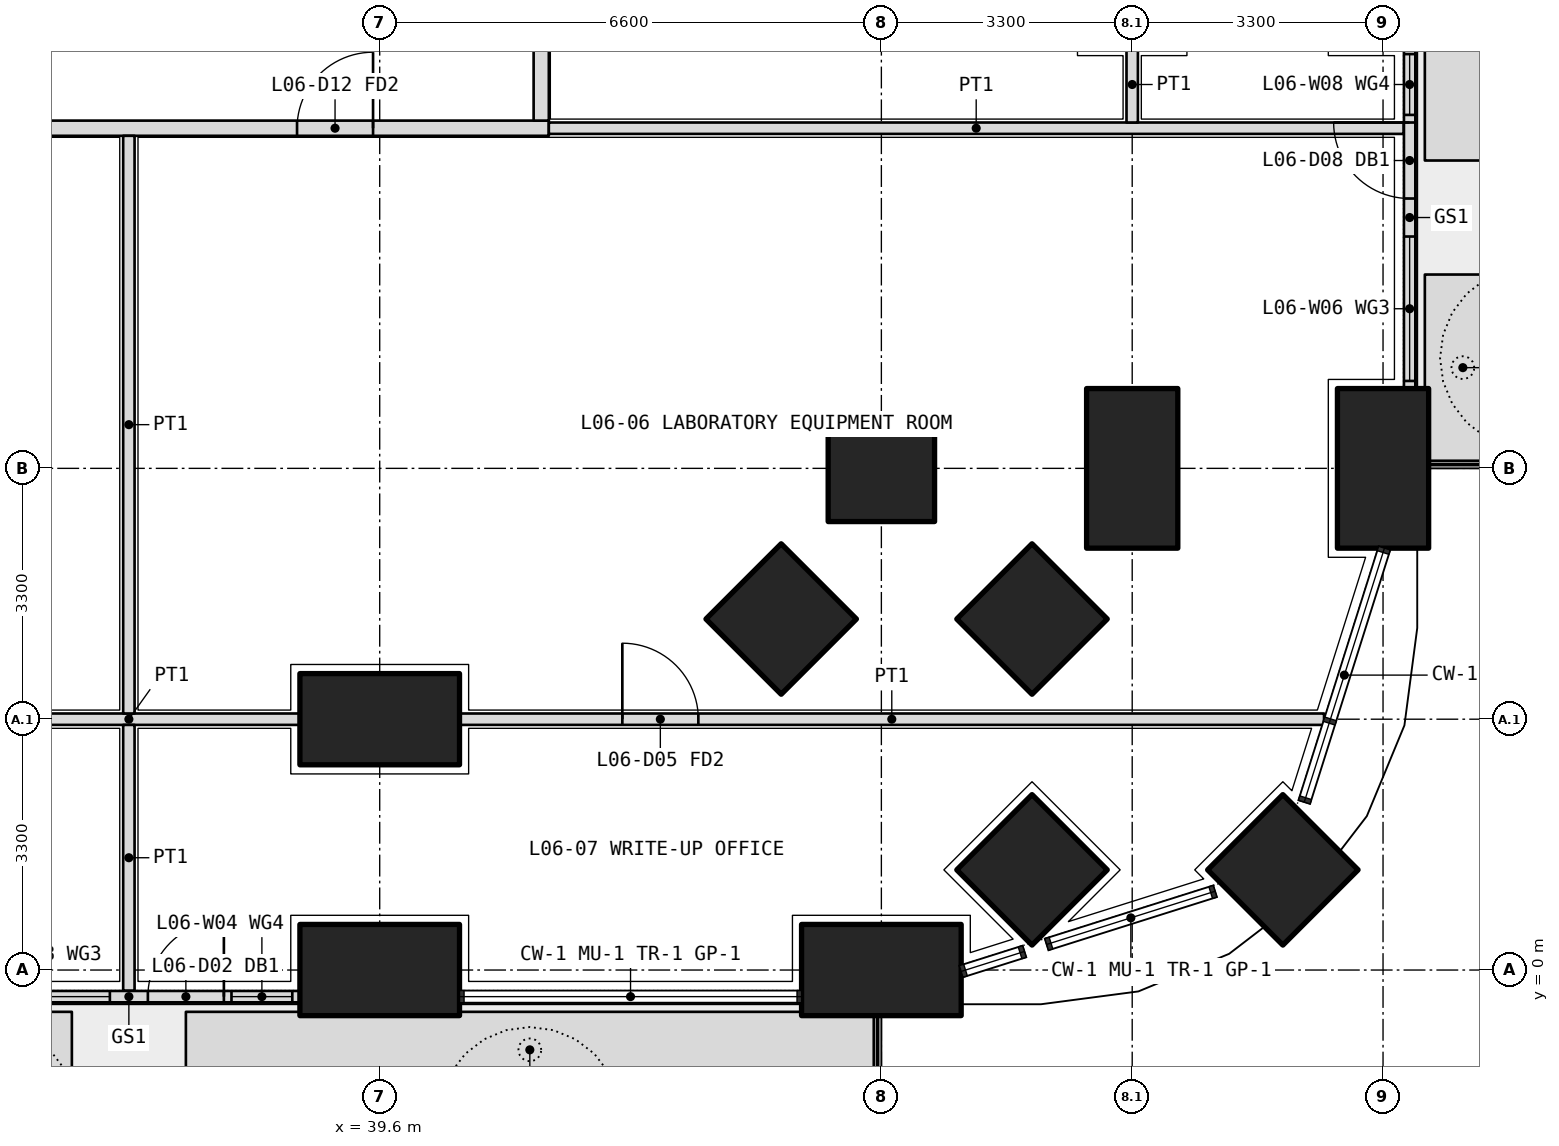
"""IFC4 building model, lengths in metres.
Left out: names, types, materials, properties, quantities, classifications, styles, units other than length and angle.
Written with IfcOpenShell. Run it as: python <this file> out.ifc"""

import sys

from ifc_helpers import new_model, si_unit, direction, frame, frame_2d, origin, origin_2d, place, context, subcontext, project, spatial, polyline, rectangle, outline, extrude, element, fill, save


model = new_model("IFC4")
c1 = context("Model", 3, precision=1e-05, world=origin(), true_north=direction((0.0, 1.0)))
c2 = subcontext(c1, "Body", "Model", "MODEL_VIEW")
j1 = project(units=[si_unit("LENGTHUNIT", "METRE"), si_unit("PLANEANGLEUNIT", "RADIAN")], contexts=[c1])
p1 = place(None, origin())
s1 = spatial("IfcSite", under=j1, at=p1, CompositionType="ELEMENT")
p2 = place(p1, origin())
s2 = spatial("IfcBuilding", under=s1, at=p2, CompositionType="ELEMENT")
p3 = place(p2, frame((0.0, 0.0, 29.7)))
s3 = spatial("IfcBuildingStorey", under=s2, at=p3, CompositionType="ELEMENT", Elevation=29.7)
p4 = place(p3, frame((51.482, 1.318, 0.0), z_axis=(0.0, 0.0, 1.0), x_axis=(0.707106781187, 0.707106781187, 0.0)))
e1 = element("IfcColumn", 1, at=p4, inside=s3, PredefinedType="COLUMN", context=c2, shape_type="SweptSolid", body=[
    extrude(rectangle(XDim=1.4, YDim=1.4, at=origin_2d()), origin(), (0.0, 0.0, 1.0), 4.2),
])
for number, where, z_axis, x_axis in (
    (2, (39.6, 0.0, 0.0), (0.0, 0.0, 1.0), (1.0, 0.0, 0.0)),
    (3, (46.2, 0.0, 0.0), (0.0, 0.0, 1.0), (1.0, 0.0, 0.0)),
    (4, (52.8, 6.6, 0.0), (0.0, 0.0, 1.0), (0.0, 1.0, 0.0)),
):
    element("IfcColumn", number, at=place(p3, frame(where, z_axis=z_axis, x_axis=x_axis)), inside=s3, PredefinedType="COLUMN", context=c2, shape_type="SweptSolid", body=[
        extrude(rectangle(XDim=2.1, YDim=1.2, at=origin_2d()), origin(), (0.0, 0.0, 1.0), 4.2),
    ])
for number, where, z_axis, x_axis in (
    (5, (46.2, 6.6, 0.0), (0.0, 0.0, 1.0), (1.0, 0.0, 0.0)),
    (6, (48.182, 1.318, 0.0), (0.0, 0.0, 1.0), (0.707, 0.707, 0.0)),
):
    element("IfcColumn", number, at=place(p3, frame(where, z_axis=z_axis, x_axis=x_axis)), inside=s3, PredefinedType="COLUMN", context=c2, shape_type="SweptSolid", body=[
        extrude(rectangle(XDim=1.4, YDim=1.4, at=origin_2d()), origin(), (0.0, 0.0, 1.0), 4.2),
    ])
p5 = place(p3, frame((49.5, 6.6, 0.0), z_axis=(0.0, 0.0, 1.0), x_axis=(0.0, 1.0, 0.0)))
e7 = element("IfcColumn", 7, at=p5, inside=s3, PredefinedType="COLUMN", context=c2, shape_type="SweptSolid", body=[
    extrude(rectangle(XDim=2.1, YDim=1.2, at=origin_2d()), origin(), (0.0, 0.0, 1.0), 4.2),
])
p6 = place(p3, frame((48.182, 4.618, 0.0), z_axis=(0.0, 0.0, 1.0), x_axis=(0.707106781187, 0.707106781187, 0.0)))
e8 = element("IfcColumn", 8, at=p6, inside=s3, PredefinedType="COLUMN", context=c2, shape_type="SweptSolid", body=[
    extrude(rectangle(XDim=1.4, YDim=1.4, at=origin_2d()), origin(), (0.0, 0.0, 1.0), 4.2),
])
p7 = place(p3, frame((39.6, 3.3, 0.0), z_axis=(0.0, 0.0, 1.0), x_axis=(1.0, 0.0, 0.0)))
e9 = element("IfcColumn", 9, at=p7, inside=s3, PredefinedType="COLUMN", context=c2, shape_type="SweptSolid", body=[
    extrude(rectangle(XDim=2.1, YDim=1.2, at=origin_2d()), origin(), (0.0, 0.0, 1.0), 4.2),
])
p8 = place(p3, frame((44.882, 4.618, 0.0), z_axis=(0.0, 0.0, 1.0), x_axis=(0.707106781187, 0.707106781187, 0.0)))
e10 = element("IfcColumn", 10, at=p8, inside=s3, PredefinedType="COLUMN", context=c2, shape_type="SweptSolid", body=[
    extrude(rectangle(XDim=1.4, YDim=1.4, at=origin_2d()), origin(), (0.0, 0.0, 1.0), 4.2),
])
p9 = place(p3, origin())
e11 = element("IfcWall", 11, at=p9, inside=s3, PredefinedType="USERDEFINED", context=c2, shape_type="SweptSolid", body=[
    extrude(outline(polyline([(33.1, -1.55), (35.55, -1.55), (35.55, -0.55), (33.1, -0.55), (33.1, -1.55)]), holes=[polyline([(33.25, -1.4), (35.4, -1.4), (35.4, -0.7), (33.25, -0.7), (33.25, -1.4)])]), origin(), (0.0, 0.0, 1.0), 1.05),
])
p10 = place(p3, origin())
e12 = element("IfcWall", 12, at=p10, inside=s3, PredefinedType="USERDEFINED", context=c2, shape_type="SweptSolid", body=[
    extrude(outline(polyline([(37.05, -1.55), (46.1, -1.55), (46.1, -0.55), (37.05, -0.55), (37.05, -1.55)]), holes=[polyline([(37.2, -1.4), (45.95, -1.4), (45.95, -0.7), (37.2, -0.7), (37.2, -1.4)])]), origin(), (0.0, 0.0, 1.0), 1.05),
])
p11 = place(p3, origin())
e13 = element("IfcWall", 13, at=p11, inside=s3, PredefinedType="USERDEFINED", context=c2, shape_type="SweptSolid", body=[
    extrude(outline(polyline([(53.35, 6.7), (54.35, 6.7), (54.35, 9.15), (53.35, 9.15), (53.35, 6.7)]), holes=[polyline([(53.5, 6.85), (54.2, 6.85), (54.2, 9.0), (53.5, 9.0), (53.5, 6.85)])]), origin(), (0.0, 0.0, 1.0), 1.05),
])
p12 = place(p3, origin())
e14 = element("IfcWall", 14, at=p12, inside=s3, PredefinedType="USERDEFINED", context=c2, shape_type="SweptSolid", body=[
    extrude(outline(polyline([(53.35, 10.65), (54.35, 10.65), (54.35, 19.7), (53.35, 19.7), (53.35, 10.65)]), holes=[polyline([(53.5, 10.8), (54.2, 10.8), (54.2, 19.55), (53.5, 19.55), (53.5, 10.8)])]), origin(), (0.0, 0.0, 1.0), 1.05),
])
p13 = place(p3, frame((34.05, -0.35, 0.0), z_axis=(0.0, 0.0, 1.0), x_axis=(1.0, 0.0, 0.0)))
e15 = element("IfcWall", 15, at=p13, inside=s3, PredefinedType="SOLIDWALL", context=c2, shape_type="SweptSolid", body=[
    extrude(rectangle(XDim=4.5, YDim=0.15, at=frame_2d((2.25, 0.0))), origin(), (0.0, 0.0, 1.0), 2.7),
])
p14 = place(p13, frame((2.5, 0.0, 0.0)))
e16 = element("IfcOpeningElement", 16, at=p14, cuts=e15, PredefinedType="OPENING", context=c2, shape_type="SweptSolid", body=[
    extrude(rectangle(XDim=1.0, YDim=2.4, at=frame_2d((0.5, 1.2))), frame((0.0, 0.085, 0.0), z_axis=(0.0, -1.0, 0.0), x_axis=(1.0, 0.0, 0.0)), (0.0, 0.0, 1.0), 0.17),
])
p15 = place(p13, frame((0.1, 0.0, 0.1)))
e17 = element("IfcOpeningElement", 17, at=p15, cuts=e15, PredefinedType="OPENING", context=c2, shape_type="SweptSolid", body=[
    extrude(rectangle(XDim=1.9, YDim=2.3, at=frame_2d((0.95, 1.15))), frame((0.0, 0.085, 0.0), z_axis=(0.0, -1.0, 0.0), x_axis=(1.0, 0.0, 0.0)), (0.0, 0.0, 1.0), 0.17),
])
p16 = place(p13, frame((3.6, 0.0, 0.1)))
e18 = element("IfcOpeningElement", 18, at=p16, cuts=e15, PredefinedType="OPENING", context=c2, shape_type="SweptSolid", body=[
    extrude(rectangle(XDim=0.8, YDim=2.3, at=frame_2d((0.4, 1.15))), frame((0.0, 0.085, 0.0), z_axis=(0.0, -1.0, 0.0), x_axis=(1.0, 0.0, 0.0)), (0.0, 0.0, 1.0), 0.17),
])
p17 = place(p3, frame((53.15, 7.65, 0.0), z_axis=(0.0, 0.0, 1.0), x_axis=(0.0, 1.0, 0.0)))
e19 = element("IfcWall", 19, at=p17, inside=s3, PredefinedType="SOLIDWALL", context=c2, shape_type="SweptSolid", body=[
    extrude(rectangle(XDim=4.5, YDim=0.15, at=frame_2d((2.25, 0.0))), origin(), (0.0, 0.0, 1.0), 2.7),
])
p18 = place(p17, frame((2.5, 0.0, 0.0)))
e20 = element("IfcOpeningElement", 20, at=p18, cuts=e19, PredefinedType="OPENING", context=c2, shape_type="SweptSolid", body=[
    extrude(rectangle(XDim=1.0, YDim=2.4, at=frame_2d((0.5, 1.2))), frame((0.0, 0.085, 0.0), z_axis=(0.0, -1.0, 0.0), x_axis=(1.0, 0.0, 0.0)), (0.0, 0.0, 1.0), 0.17),
])
p19 = place(p17, frame((0.1, 0.0, 0.1)))
e21 = element("IfcOpeningElement", 21, at=p19, cuts=e19, PredefinedType="OPENING", context=c2, shape_type="SweptSolid", body=[
    extrude(rectangle(XDim=1.9, YDim=2.3, at=frame_2d((0.95, 1.15))), frame((0.0, 0.085, 0.0), z_axis=(0.0, -1.0, 0.0), x_axis=(1.0, 0.0, 0.0)), (0.0, 0.0, 1.0), 0.17),
])
p20 = place(p17, frame((3.6, 0.0, 0.1)))
e22 = element("IfcOpeningElement", 22, at=p20, cuts=e19, PredefinedType="OPENING", context=c2, shape_type="SweptSolid", body=[
    extrude(rectangle(XDim=0.8, YDim=2.3, at=frame_2d((0.4, 1.15))), frame((0.0, 0.085, 0.0), z_axis=(0.0, -1.0, 0.0), x_axis=(1.0, 0.0, 0.0)), (0.0, 0.0, 1.0), 0.17),
])
p21 = place(p3, frame((10.975, 11.075, 0.0), z_axis=(0.0, 0.0, 1.0), x_axis=(1.0, 0.0, 0.0)))
e23 = element("IfcWall", 23, at=p21, inside=s3, PredefinedType="PARTITIONING", context=c2, shape_type="SweptSolid", body=[
    extrude(rectangle(XDim=30.85, YDim=0.2, at=frame_2d((15.425, 0.0))), origin(), (0.0, 0.0, 1.0), 2.85),
])
p22 = place(p21, frame((0.663, 0.0, 0.0)))
e24 = element("IfcOpeningElement", 24, at=p22, cuts=e23, PredefinedType="OPENING", context=c2, shape_type="SweptSolid", body=[
    extrude(rectangle(XDim=1.0, YDim=2.1, at=frame_2d((0.5, 1.05))), frame((0.0, 0.11, 0.0), z_axis=(0.0, -1.0, 0.0), x_axis=(1.0, 0.0, 0.0)), (0.0, 0.0, 1.0), 0.22),
])
p23 = place(p21, frame((8.325, 0.0, 0.0)))
e25 = element("IfcOpeningElement", 25, at=p23, cuts=e23, PredefinedType="OPENING", context=c2, shape_type="SweptSolid", body=[
    extrude(rectangle(XDim=1.0, YDim=2.1, at=frame_2d((0.5, 1.05))), frame((0.0, 0.11, 0.0), z_axis=(0.0, -1.0, 0.0), x_axis=(1.0, 0.0, 0.0)), (0.0, 0.0, 1.0), 0.22),
])
p24 = place(p21, frame((19.875, 0.0, 0.0)))
e26 = element("IfcOpeningElement", 26, at=p24, cuts=e23, PredefinedType="OPENING", context=c2, shape_type="SweptSolid", body=[
    extrude(rectangle(XDim=1.0, YDim=2.1, at=frame_2d((0.5, 1.05))), frame((0.0, 0.11, 0.0), z_axis=(0.0, -1.0, 0.0), x_axis=(1.0, 0.0, 0.0)), (0.0, 0.0, 1.0), 0.22),
])
p25 = place(p21, frame((27.538, 0.0, 0.0)))
e27 = element("IfcOpeningElement", 27, at=p25, cuts=e23, PredefinedType="OPENING", context=c2, shape_type="SweptSolid", body=[
    extrude(rectangle(XDim=1.0, YDim=2.1, at=frame_2d((0.5, 1.05))), frame((0.0, 0.11, 0.0), z_axis=(0.0, -1.0, 0.0), x_axis=(1.0, 0.0, 0.0)), (0.0, 0.0, 1.0), 0.22),
])
p26 = place(p3, frame((41.725, 11.175, 0.0), z_axis=(0.0, 0.0, 1.0), x_axis=(0.0, 1.0, 0.0)))
e28 = element("IfcWall", 28, at=p26, inside=s3, PredefinedType="PARTITIONING", context=c2, shape_type="SweptSolid", body=[
    extrude(rectangle(XDim=18.525, YDim=0.2, at=frame_2d((9.262, 0.0))), origin(), (0.0, 0.0, 1.0), 2.85),
])
p27 = place(p26, frame((3.663, 0.0, 0.0)))
e29 = element("IfcOpeningElement", 29, at=p27, cuts=e28, PredefinedType="OPENING", context=c2, shape_type="SweptSolid", body=[
    extrude(rectangle(XDim=1.2, YDim=2.1, at=frame_2d((0.6, 1.05))), frame((0.0, 0.11, 0.0), z_axis=(0.0, -1.0, 0.0), x_axis=(1.0, 0.0, 0.0)), (0.0, 0.0, 1.0), 0.22),
])
p28 = place(p26, frame((9.625, 0.0, 0.0)))
e30 = element("IfcOpeningElement", 30, at=p28, cuts=e28, PredefinedType="OPENING", context=c2, shape_type="SweptSolid", body=[
    extrude(rectangle(XDim=1.0, YDim=2.1, at=frame_2d((0.5, 1.05))), frame((0.0, 0.11, 0.0), z_axis=(0.0, -1.0, 0.0), x_axis=(1.0, 0.0, 0.0)), (0.0, 0.0, 1.0), 0.22),
])
p29 = place(p26, frame((12.975, 0.0, 0.0)))
e31 = element("IfcOpeningElement", 31, at=p29, cuts=e28, PredefinedType="OPENING", context=c2, shape_type="SweptSolid", body=[
    extrude(rectangle(XDim=0.9, YDim=2.1, at=frame_2d((0.45, 1.05))), frame((0.0, 0.11, 0.0), z_axis=(0.0, -1.0, 0.0), x_axis=(1.0, 0.0, 0.0)), (0.0, 0.0, 1.0), 0.22),
])
p30 = place(p26, frame((16.275, 0.0, 0.0)))
e32 = element("IfcOpeningElement", 32, at=p30, cuts=e28, PredefinedType="OPENING", context=c2, shape_type="SweptSolid", body=[
    extrude(rectangle(XDim=1.2, YDim=2.1, at=frame_2d((0.6, 1.05))), frame((0.0, 0.11, 0.0), z_axis=(0.0, -1.0, 0.0), x_axis=(1.0, 0.0, 0.0)), (0.0, 0.0, 1.0), 0.22),
])
p31 = place(p3, frame((53.07, 11.075, 0.0), z_axis=(0.0, 0.0, 1.0), x_axis=(-1.0, 0.0, 0.0)))
e33 = element("IfcWall", 33, at=p31, inside=s3, PredefinedType="PARTITIONING", context=c2, shape_type="SweptSolid", body=[
    extrude(rectangle(XDim=11.245, YDim=0.15, at=frame_2d((5.623, 0.0))), origin(), (0.0, 0.0, 1.0), 2.7),
])
p32 = place(p3, frame((34.05, 3.3, 0.0), z_axis=(0.0, 0.0, 1.0), x_axis=(1.0, 0.0, 0.0)))
e34 = element("IfcWall", 34, at=p32, inside=s3, PredefinedType="PARTITIONING", context=c2, shape_type="SweptSolid", body=[
    extrude(rectangle(XDim=4.5, YDim=0.15, at=frame_2d((2.25, 0.0))), origin(), (0.0, 0.0, 1.0), 3.9),
])
p33 = place(p3, frame((40.65, 3.3, 0.0), z_axis=(0.0, 0.0, 1.0), x_axis=(1.0, 0.0, 0.0)))
e35 = element("IfcWall", 35, at=p33, inside=s3, PredefinedType="PARTITIONING", context=c2, shape_type="SweptSolid", body=[
    extrude(rectangle(XDim=11.374, YDim=0.15, at=frame_2d((5.687, 0.0))), origin(), (0.0, 0.0, 1.0), 2.7),
])
p34 = place(p33, frame((2.142, 0.0, 0.0)))
e36 = element("IfcOpeningElement", 36, at=p34, cuts=e35, PredefinedType="OPENING", context=c2, shape_type="SweptSolid", body=[
    extrude(rectangle(XDim=1.0, YDim=2.1, at=frame_2d((0.5, 1.05))), frame((0.0, 0.085, 0.0), z_axis=(0.0, -1.0, 0.0), x_axis=(1.0, 0.0, 0.0)), (0.0, 0.0, 1.0), 0.17),
])
p35 = place(p3, frame((36.3, -0.27, 0.0), z_axis=(0.0, 0.0, 1.0), x_axis=(0.0, 1.0, 0.0)))
e37 = element("IfcWall", 37, at=p35, inside=s3, PredefinedType="PARTITIONING", context=c2, shape_type="SweptSolid", body=[
    extrude(rectangle(XDim=3.495, YDim=0.15, at=frame_2d((1.748, 0.0))), origin(), (0.0, 0.0, 1.0), 2.7),
])
p36 = place(p3, frame((36.3, 3.375, 0.0), z_axis=(0.0, 0.0, 1.0), x_axis=(0.0, 1.0, 0.0)))
e38 = element("IfcWall", 38, at=p36, inside=s3, PredefinedType="PARTITIONING", context=c2, shape_type="SweptSolid", body=[
    extrude(rectangle(XDim=7.6, YDim=0.15, at=frame_2d((3.8, 0.0))), origin(), (0.0, 0.0, 1.0), 3.9),
])
p37 = place(p3, frame((49.5, 11.15, 0.0), z_axis=(0.0, 0.0, 1.0), x_axis=(0.0, 1.0, 0.0)))
e39 = element("IfcWall", 39, at=p37, inside=s3, PredefinedType="PARTITIONING", context=c2, shape_type="SweptSolid", body=[
    extrude(rectangle(XDim=1.0, YDim=0.15, at=frame_2d((0.5, 0.0))), origin(), (0.0, 0.0, 1.0), 3.9),
])
p38 = place(p14, origin())
e40 = element("IfcDoor", 40, at=p38, inside=s3, OperationType="SINGLE_SWING_RIGHT", PredefinedType="DOOR", context=c2, shape_type="SweptSolid", body=[
    extrude(rectangle(XDim=1.0, YDim=2.4, at=frame_2d((0.5, 1.2))), frame((0.0, 0.025, 0.0), z_axis=(0.0, -1.0, 0.0), x_axis=(1.0, 0.0, 0.0)), (0.0, 0.0, 1.0), 0.05),
])
fill(e16, e40)
p39 = place(p15, origin())
e41 = element("IfcWindow", 41, at=p39, inside=s3, PartitioningType="SINGLE_PANEL", PredefinedType="WINDOW", context=c2, shape_type="SweptSolid", body=[
    extrude(rectangle(XDim=1.9, YDim=2.3, at=frame_2d((0.95, 1.15))), frame((0.0, 0.03, 0.0), z_axis=(0.0, -1.0, 0.0), x_axis=(1.0, 0.0, 0.0)), (0.0, 0.0, 1.0), 0.06),
])
fill(e17, e41)
p40 = place(p16, origin())
e42 = element("IfcWindow", 42, at=p40, inside=s3, PartitioningType="SINGLE_PANEL", PredefinedType="WINDOW", context=c2, shape_type="SweptSolid", body=[
    extrude(rectangle(XDim=0.8, YDim=2.3, at=frame_2d((0.4, 1.15))), frame((0.0, 0.03, 0.0), z_axis=(0.0, -1.0, 0.0), x_axis=(1.0, 0.0, 0.0)), (0.0, 0.0, 1.0), 0.06),
])
fill(e18, e42)
p41 = place(p18, origin())
e43 = element("IfcDoor", 43, at=p41, inside=s3, OperationType="SINGLE_SWING_RIGHT", PredefinedType="DOOR", context=c2, shape_type="SweptSolid", body=[
    extrude(rectangle(XDim=1.0, YDim=2.4, at=frame_2d((0.5, 1.2))), frame((0.0, 0.025, 0.0), z_axis=(0.0, -1.0, 0.0), x_axis=(1.0, 0.0, 0.0)), (0.0, 0.0, 1.0), 0.05),
])
fill(e20, e43)
p42 = place(p19, origin())
e44 = element("IfcWindow", 44, at=p42, inside=s3, PartitioningType="SINGLE_PANEL", PredefinedType="WINDOW", context=c2, shape_type="SweptSolid", body=[
    extrude(rectangle(XDim=1.9, YDim=2.3, at=frame_2d((0.95, 1.15))), frame((0.0, 0.03, 0.0), z_axis=(0.0, -1.0, 0.0), x_axis=(1.0, 0.0, 0.0)), (0.0, 0.0, 1.0), 0.06),
])
fill(e21, e44)
p43 = place(p20, origin())
e45 = element("IfcWindow", 45, at=p43, inside=s3, PartitioningType="SINGLE_PANEL", PredefinedType="WINDOW", context=c2, shape_type="SweptSolid", body=[
    extrude(rectangle(XDim=0.8, YDim=2.3, at=frame_2d((0.4, 1.15))), frame((0.0, 0.03, 0.0), z_axis=(0.0, -1.0, 0.0), x_axis=(1.0, 0.0, 0.0)), (0.0, 0.0, 1.0), 0.06),
])
fill(e22, e45)
p44 = place(p25, origin())
e46 = element("IfcDoor", 46, at=p44, inside=s3, OperationType="SINGLE_SWING_RIGHT", PredefinedType="DOOR", context=c2, shape_type="SweptSolid", body=[
    extrude(rectangle(XDim=1.0, YDim=2.1, at=frame_2d((0.5, 1.05))), frame((0.0, 0.025, 0.0), z_axis=(0.0, -1.0, 0.0), x_axis=(1.0, 0.0, 0.0)), (0.0, 0.0, 1.0), 0.05),
])
fill(e27, e46)
p45 = place(p34, origin())
e47 = element("IfcDoor", 47, at=p45, inside=s3, OperationType="SINGLE_SWING_LEFT", PredefinedType="DOOR", context=c2, shape_type="SweptSolid", body=[
    extrude(rectangle(XDim=1.0, YDim=2.1, at=frame_2d((0.5, 1.05))), frame((0.0, 0.025, 0.0), z_axis=(0.0, -1.0, 0.0), x_axis=(1.0, 0.0, 0.0)), (0.0, 0.0, 1.0), 0.05),
])
fill(e36, e47)
save(model, sys.argv[1])
